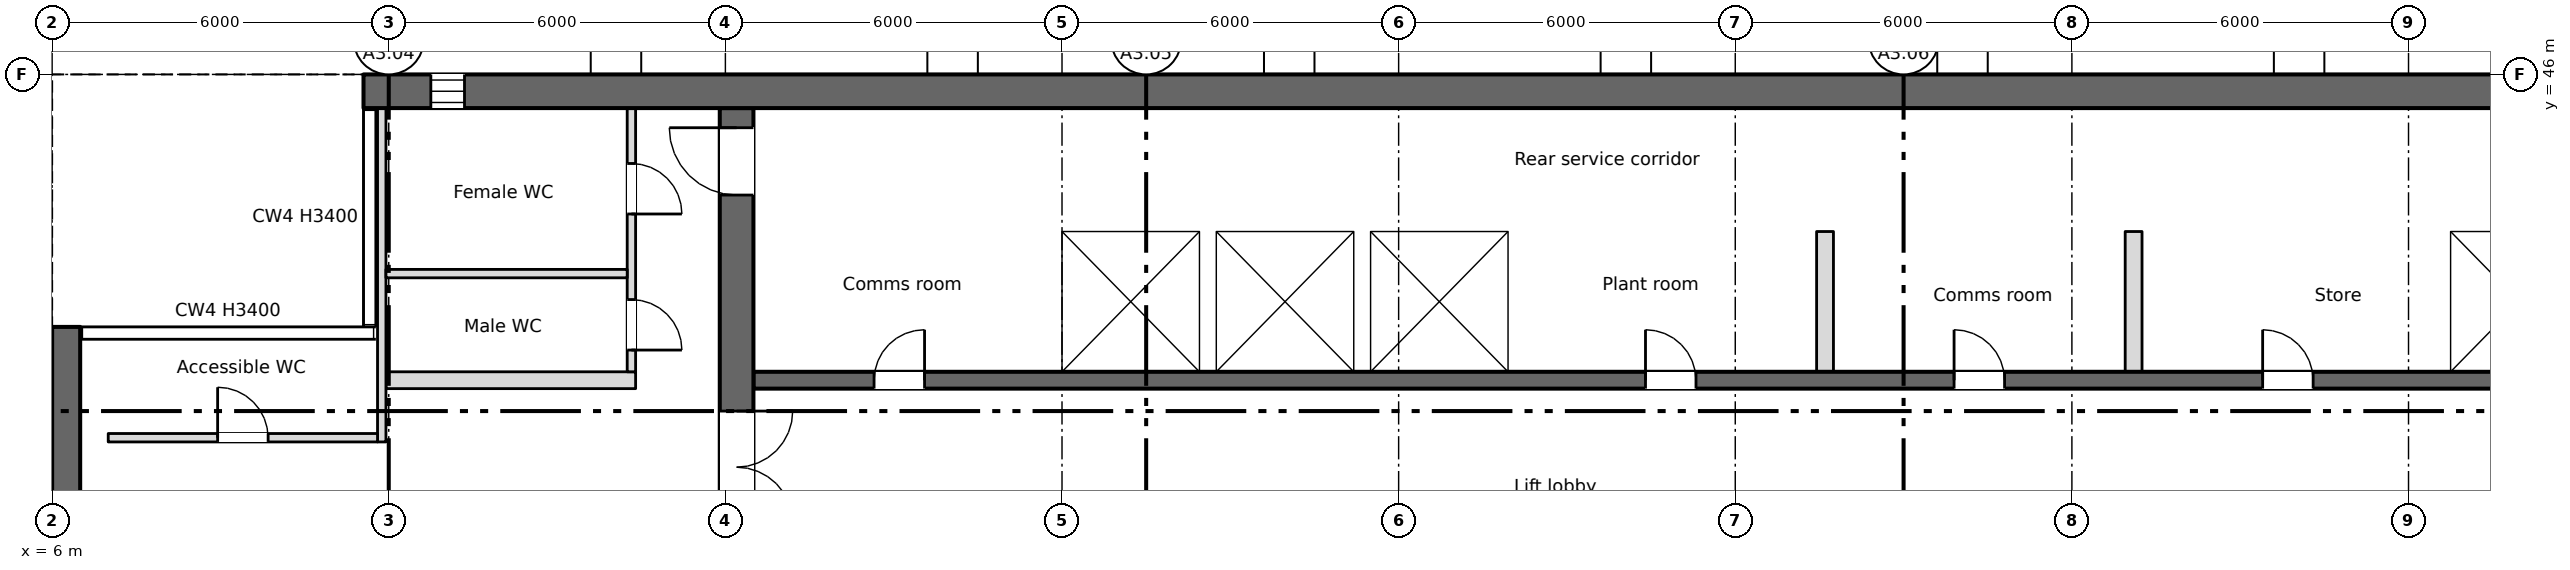
"""IFC4 building model, lengths in metres.
Left out: names, types, materials, properties, quantities, classifications, styles, units other than length and angle.
Written with IfcOpenShell. Run it as: python <this file> out.ifc"""

import sys

from ifc_helpers import new_model, si_unit, direction, frame, frame_2d, origin, place, context, subcontext, project, spatial, rectangle, extrude, element, fill, save


model = new_model("IFC4")
c1 = context("Model", 3, precision=1e-05, world=origin(), true_north=direction((0.0, 1.0)))
c2 = subcontext(c1, "Body", "Model", "MODEL_VIEW")
j1 = project(units=[si_unit("LENGTHUNIT", "METRE"), si_unit("PLANEANGLEUNIT", "RADIAN")], contexts=[c1])
p1 = place(None, origin())
s1 = spatial("IfcSite", under=j1, at=p1, CompositionType="ELEMENT")
p2 = place(p1, origin())
s2 = spatial("IfcBuilding", under=s1, at=p2, CompositionType="ELEMENT")
p3 = place(p2, frame((0.0, 0.0, 231.75)))
s3 = spatial("IfcBuildingStorey", under=s2, at=p3, CompositionType="ELEMENT", Elevation=231.75)
p4 = place(p3, frame((6.25, 8.5, 0.0), z_axis=(0.0, 0.0, 1.0), x_axis=(0.0, 1.0, 0.0)))
e1 = element("IfcWall", 1, at=p4, inside=s3, PredefinedType="SHEAR", context=c2, shape_type="SweptSolid", body=[
    extrude(rectangle(XDim=33.0, YDim=0.5, at=frame_2d((16.5, 0.0))), origin(), (0.0, 0.0, 1.0), 3.4),
])
p5 = place(p4, frame((1.2, 0.0, 0.6)))
e2 = element("IfcOpeningElement", 2, at=p5, cuts=e1, PredefinedType="OPENING", context=c2, shape_type="SweptSolid", body=[
    extrude(rectangle(XDim=0.6, YDim=2.4, at=frame_2d((0.3, 1.2))), frame((0.0, 0.26, 0.0), z_axis=(0.0, -1.0, 0.0), x_axis=(1.0, 0.0, 0.0)), (0.0, 0.0, 1.0), 0.52),
])
p6 = place(p4, frame((7.2, 0.0, 0.6)))
e3 = element("IfcOpeningElement", 3, at=p6, cuts=e1, PredefinedType="OPENING", context=c2, shape_type="SweptSolid", body=[
    extrude(rectangle(XDim=0.6, YDim=2.4, at=frame_2d((0.3, 1.2))), frame((0.0, 0.26, 0.0), z_axis=(0.0, -1.0, 0.0), x_axis=(1.0, 0.0, 0.0)), (0.0, 0.0, 1.0), 0.52),
])
p7 = place(p4, frame((13.2, 0.0, 0.6)))
e4 = element("IfcOpeningElement", 4, at=p7, cuts=e1, PredefinedType="OPENING", context=c2, shape_type="SweptSolid", body=[
    extrude(rectangle(XDim=0.6, YDim=2.4, at=frame_2d((0.3, 1.2))), frame((0.0, 0.26, 0.0), z_axis=(0.0, -1.0, 0.0), x_axis=(1.0, 0.0, 0.0)), (0.0, 0.0, 1.0), 0.52),
])
p8 = place(p3, frame((11.55, 45.7, 0.0), z_axis=(0.0, 0.0, 1.0), x_axis=(1.0, 0.0, 0.0)))
e5 = element("IfcWall", 5, at=p8, inside=s3, PredefinedType="SHEAR", context=c2, shape_type="SweptSolid", body=[
    extrude(rectangle(XDim=48.9, YDim=0.6, at=frame_2d((24.45, 0.0))), origin(), (0.0, 0.0, 1.0), 3.4),
])
p9 = place(p8, frame((1.2, 0.0, 0.6)))
e6 = element("IfcOpeningElement", 6, at=p9, cuts=e5, PredefinedType="OPENING", context=c2, shape_type="SweptSolid", body=[
    extrude(rectangle(XDim=0.6, YDim=2.4, at=frame_2d((0.3, 1.2))), frame((0.0, 0.31, 0.0), z_axis=(0.0, -1.0, 0.0), x_axis=(1.0, 0.0, 0.0)), (0.0, 0.0, 1.0), 0.62),
])
p10 = place(p3, frame((6.75, 28.4, 0.0), z_axis=(0.0, 0.0, 1.0), x_axis=(0.0, 1.0, 0.0)))
e7 = element("IfcWall", 7, at=p10, inside=s3, PredefinedType="SHEAR", context=c2, shape_type="SweptSolid", body=[
    extrude(rectangle(XDim=12.85, YDim=0.5, at=frame_2d((6.425, 0.0))), origin(), (0.0, 0.0, 1.0), 3.4),
])
p11 = place(p3, frame((18.2, 28.4, 0.0), z_axis=(0.0, 0.0, 1.0), x_axis=(0.0, 1.0, 0.0)))
e8 = element("IfcWall", 8, at=p11, inside=s3, PredefinedType="SHEAR", context=c2, shape_type="SweptSolid", body=[
    extrude(rectangle(XDim=17.0, YDim=0.6, at=frame_2d((8.5, 0.0))), origin(), (0.0, 0.0, 1.0), 3.4),
])
p12 = place(p11, frame((9.6, 0.0, 0.0)))
e9 = element("IfcOpeningElement", 9, at=p12, cuts=e8, PredefinedType="OPENING", context=c2, shape_type="SweptSolid", body=[
    extrude(rectangle(XDim=2.0, YDim=2.1, at=frame_2d((1.0, 1.05))), frame((0.0, 0.31, 0.0), z_axis=(0.0, -1.0, 0.0), x_axis=(1.0, 0.0, 0.0)), (0.0, 0.0, 1.0), 0.62),
])
p13 = place(p11, frame((15.45, 0.0, 0.0)))
e10 = element("IfcOpeningElement", 10, at=p13, cuts=e8, PredefinedType="OPENING", context=c2, shape_type="SweptSolid", body=[
    extrude(rectangle(XDim=1.2, YDim=2.1, at=frame_2d((0.6, 1.05))), frame((0.0, 0.31, 0.0), z_axis=(0.0, -1.0, 0.0), x_axis=(1.0, 0.0, 0.0)), (0.0, 0.0, 1.0), 0.62),
])
p14 = place(p3, frame((18.5, 40.55, 0.0), z_axis=(0.0, 0.0, 1.0), x_axis=(1.0, 0.0, 0.0)))
e11 = element("IfcWall", 11, at=p14, inside=s3, PredefinedType="SHEAR", context=c2, shape_type="SweptSolid", body=[
    extrude(rectangle(XDim=41.0, YDim=0.3, at=frame_2d((20.5, 0.0))), origin(), (0.0, 0.0, 1.0), 3.4),
])
p15 = place(p14, frame((2.15, 0.0, 0.0)))
e12 = element("IfcOpeningElement", 12, at=p15, cuts=e11, PredefinedType="OPENING", context=c2, shape_type="SweptSolid", body=[
    extrude(rectangle(XDim=0.9, YDim=2.1, at=frame_2d((0.45, 1.05))), frame((0.0, 0.16, 0.0), z_axis=(0.0, -1.0, 0.0), x_axis=(1.0, 0.0, 0.0)), (0.0, 0.0, 1.0), 0.32),
])
p16 = place(p14, frame((15.9, 0.0, 0.0)))
e13 = element("IfcOpeningElement", 13, at=p16, cuts=e11, PredefinedType="OPENING", context=c2, shape_type="SweptSolid", body=[
    extrude(rectangle(XDim=0.9, YDim=2.1, at=frame_2d((0.45, 1.05))), frame((0.0, 0.16, 0.0), z_axis=(0.0, -1.0, 0.0), x_axis=(1.0, 0.0, 0.0)), (0.0, 0.0, 1.0), 0.32),
])
p17 = place(p14, frame((21.4, 0.0, 0.0)))
e14 = element("IfcOpeningElement", 14, at=p17, cuts=e11, PredefinedType="OPENING", context=c2, shape_type="SweptSolid", body=[
    extrude(rectangle(XDim=0.9, YDim=2.1, at=frame_2d((0.45, 1.05))), frame((0.0, 0.16, 0.0), z_axis=(0.0, -1.0, 0.0), x_axis=(1.0, 0.0, 0.0)), (0.0, 0.0, 1.0), 0.32),
])
p18 = place(p14, frame((26.9, 0.0, 0.0)))
e15 = element("IfcOpeningElement", 15, at=p18, cuts=e11, PredefinedType="OPENING", context=c2, shape_type="SweptSolid", body=[
    extrude(rectangle(XDim=0.9, YDim=2.1, at=frame_2d((0.45, 1.05))), frame((0.0, 0.16, 0.0), z_axis=(0.0, -1.0, 0.0), x_axis=(1.0, 0.0, 0.0)), (0.0, 0.0, 1.0), 0.32),
])
p19 = place(p14, frame((6.175, 0.0, 0.0)))
e16 = element("IfcOpeningElement", 16, at=p19, cuts=e11, PredefinedType="OPENING", context=c2, shape_type="SweptSolid", body=[
    extrude(rectangle(XDim=1.1, YDim=2.1, at=frame_2d((0.55, 1.05))), frame((0.0, 0.16, 0.0), z_axis=(0.0, -1.0, 0.0), x_axis=(1.0, 0.0, 0.0)), (0.0, 0.0, 1.0), 0.32),
])
p20 = place(p14, frame((8.925, 0.0, 0.0)))
e17 = element("IfcOpeningElement", 17, at=p20, cuts=e11, PredefinedType="OPENING", context=c2, shape_type="SweptSolid", body=[
    extrude(rectangle(XDim=1.1, YDim=2.1, at=frame_2d((0.55, 1.05))), frame((0.0, 0.16, 0.0), z_axis=(0.0, -1.0, 0.0), x_axis=(1.0, 0.0, 0.0)), (0.0, 0.0, 1.0), 0.32),
])
p21 = place(p14, frame((11.675, 0.0, 0.0)))
e18 = element("IfcOpeningElement", 18, at=p21, cuts=e11, PredefinedType="OPENING", context=c2, shape_type="SweptSolid", body=[
    extrude(rectangle(XDim=1.1, YDim=2.1, at=frame_2d((0.55, 1.05))), frame((0.0, 0.16, 0.0), z_axis=(0.0, -1.0, 0.0), x_axis=(1.0, 0.0, 0.0)), (0.0, 0.0, 1.0), 0.32),
])
p22 = place(p14, frame((30.925, 0.0, 0.0)))
e19 = element("IfcOpeningElement", 19, at=p22, cuts=e11, PredefinedType="OPENING", context=c2, shape_type="SweptSolid", body=[
    extrude(rectangle(XDim=1.1, YDim=2.1, at=frame_2d((0.55, 1.05))), frame((0.0, 0.16, 0.0), z_axis=(0.0, -1.0, 0.0), x_axis=(1.0, 0.0, 0.0)), (0.0, 0.0, 1.0), 0.32),
])
p23 = place(p14, frame((33.675, 0.0, 0.0)))
e20 = element("IfcOpeningElement", 20, at=p23, cuts=e11, PredefinedType="OPENING", context=c2, shape_type="SweptSolid", body=[
    extrude(rectangle(XDim=1.1, YDim=2.1, at=frame_2d((0.55, 1.05))), frame((0.0, 0.16, 0.0), z_axis=(0.0, -1.0, 0.0), x_axis=(1.0, 0.0, 0.0)), (0.0, 0.0, 1.0), 0.32),
])
p24 = place(p14, frame((36.375, 0.0, 0.0)))
e21 = element("IfcOpeningElement", 21, at=p24, cuts=e11, PredefinedType="OPENING", context=c2, shape_type="SweptSolid", body=[
    extrude(rectangle(XDim=1.2, YDim=2.1, at=frame_2d((0.6, 1.05))), frame((0.0, 0.16, 0.0), z_axis=(0.0, -1.0, 0.0), x_axis=(1.0, 0.0, 0.0)), (0.0, 0.0, 1.0), 0.32),
])
p25 = place(p14, frame((39.15, 0.0, 0.0)))
e22 = element("IfcOpeningElement", 22, at=p25, cuts=e11, PredefinedType="OPENING", context=c2, shape_type="SweptSolid", body=[
    extrude(rectangle(XDim=1.2, YDim=2.1, at=frame_2d((0.6, 1.05))), frame((0.0, 0.16, 0.0), z_axis=(0.0, -1.0, 0.0), x_axis=(1.0, 0.0, 0.0)), (0.0, 0.0, 1.0), 0.32),
])
p26 = place(p3, frame((18.5, 43.35, 0.0), z_axis=(0.0, 0.0, 1.0), x_axis=(1.0, 0.0, 0.0)))
e23 = element("IfcWall", 23, at=p26, inside=s3, PredefinedType="SHEAR", context=c2, shape_type="SweptSolid", body=[
    extrude(rectangle(XDim=41.0, YDim=0.3, at=frame_2d((20.5, 0.0))), origin(), (0.0, 0.0, 1.0), 3.4),
])
p27 = place(p3, frame((11.95, 40.55, 0.0), z_axis=(0.0, 0.0, 1.0), x_axis=(1.0, 0.0, 0.0)))
e24 = element("IfcWall", 24, at=p27, inside=s3, PredefinedType="PARTITIONING", context=c2, shape_type="SweptSolid", body=[
    extrude(rectangle(XDim=4.45, YDim=0.3, at=frame_2d((2.225, 0.0))), origin(), (0.0, 0.0, 1.0), 3.4),
])
for number, where, z_axis, x_axis in (
    (25, (23.85, 40.7, 0.0), (0.0, 0.0, 1.0), (0.0, 1.0, 0.0)),
    (26, (26.6, 40.7, 0.0), (0.0, 0.0, 1.0), (0.0, 1.0, 0.0)),
    (27, (29.35, 40.7, 0.0), (0.0, 0.0, 1.0), (0.0, 1.0, 0.0)),
    (28, (32.1, 40.7, 0.0), (0.0, 0.0, 1.0), (0.0, 1.0, 0.0)),
    (29, (48.6, 40.7, 0.0), (0.0, 0.0, 1.0), (0.0, 1.0, 0.0)),
):
    element("IfcWall", number, at=place(p3, frame(where, z_axis=z_axis, x_axis=x_axis)), inside=s3, PredefinedType="SHEAR", context=c2, shape_type="SweptSolid", body=[
        extrude(rectangle(XDim=2.5, YDim=0.3, at=frame_2d((1.25, 0.0))), origin(), (0.0, 0.0, 1.0), 3.4),
    ])
p28 = place(p3, frame((16.325, 45.4, 0.0), z_axis=(0.0, 0.0, 1.0), x_axis=(0.0, -1.0, 0.0)))
e30 = element("IfcWall", 30, at=p28, inside=s3, PredefinedType="PARTITIONING", context=c2, shape_type="SweptSolid", body=[
    extrude(rectangle(XDim=4.7, YDim=0.15, at=frame_2d((2.35, 0.0))), origin(), (0.0, 0.0, 1.0), 3.4),
])
p29 = place(p28, frame((3.413, 0.0, 0.0)))
e31 = element("IfcOpeningElement", 31, at=p29, cuts=e30, PredefinedType="OPENING", context=c2, shape_type="SweptSolid", body=[
    extrude(rectangle(XDim=0.9, YDim=2.1, at=frame_2d((0.45, 1.05))), frame((0.0, 0.085, 0.0), z_axis=(0.0, -1.0, 0.0), x_axis=(1.0, 0.0, 0.0)), (0.0, 0.0, 1.0), 0.17),
])
p30 = place(p28, frame((0.988, 0.0, 0.0)))
e32 = element("IfcOpeningElement", 32, at=p30, cuts=e30, PredefinedType="OPENING", context=c2, shape_type="SweptSolid", body=[
    extrude(rectangle(XDim=0.9, YDim=2.1, at=frame_2d((0.45, 1.05))), frame((0.0, 0.085, 0.0), z_axis=(0.0, -1.0, 0.0), x_axis=(1.0, 0.0, 0.0)), (0.0, 0.0, 1.0), 0.17),
])
p31 = place(p3, frame((11.875, 39.45, 0.0), z_axis=(0.0, 0.0, 1.0), x_axis=(0.0, 1.0, 0.0)))
e33 = element("IfcWall", 33, at=p31, inside=s3, PredefinedType="PARTITIONING", context=c2, shape_type="SweptSolid", body=[
    extrude(rectangle(XDim=5.95, YDim=0.15, at=frame_2d((2.975, 0.0))), origin(), (0.0, 0.0, 1.0), 3.4),
])
p32 = place(p3, frame((7.0, 39.525, 0.0), z_axis=(0.0, 0.0, 1.0), x_axis=(1.0, 0.0, 0.0)))
e34 = element("IfcWall", 34, at=p32, inside=s3, PredefinedType="PARTITIONING", context=c2, shape_type="SweptSolid", body=[
    extrude(rectangle(XDim=4.8, YDim=0.15, at=frame_2d((2.4, 0.0))), origin(), (0.0, 0.0, 1.0), 3.4),
])
p33 = place(p32, frame((1.95, 0.0, 0.0)))
e35 = element("IfcOpeningElement", 35, at=p33, cuts=e34, PredefinedType="OPENING", context=c2, shape_type="SweptSolid", body=[
    extrude(rectangle(XDim=0.9, YDim=2.1, at=frame_2d((0.45, 1.05))), frame((0.0, 0.085, 0.0), z_axis=(0.0, -1.0, 0.0), x_axis=(1.0, 0.0, 0.0)), (0.0, 0.0, 1.0), 0.17),
])
p34 = place(p3, frame((11.95, 42.45, 0.0), z_axis=(0.0, 0.0, 1.0), x_axis=(1.0, 0.0, 0.0)))
e36 = element("IfcWall", 36, at=p34, inside=s3, PredefinedType="PARTITIONING", context=c2, shape_type="SweptSolid", body=[
    extrude(rectangle(XDim=4.3, YDim=0.15, at=frame_2d((2.15, 0.0))), origin(), (0.0, 0.0, 1.0), 3.4),
])
for number, where, z_axis, x_axis in (
    (37, (37.6, 40.7, 0.0), (0.0, 0.0, 1.0), (0.0, 1.0, 0.0)),
    (38, (43.1, 40.7, 0.0), (0.0, 0.0, 1.0), (0.0, 1.0, 0.0)),
):
    element("IfcWall", number, at=place(p3, frame(where, z_axis=z_axis, x_axis=x_axis)), inside=s3, PredefinedType="PARTITIONING", context=c2, shape_type="SweptSolid", body=[
        extrude(rectangle(XDim=2.5, YDim=0.3, at=frame_2d((1.25, 0.0))), origin(), (0.0, 0.0, 1.0), 3.4),
    ])
p35 = place(p9, origin())
e39 = element("IfcWindow", 39, at=p35, inside=s3, PartitioningType="SINGLE_PANEL", PredefinedType="WINDOW", context=c2, shape_type="SweptSolid", body=[
    extrude(rectangle(XDim=0.6, YDim=2.4, at=frame_2d((0.3, 1.2))), frame((0.0, 0.03, 0.0), z_axis=(0.0, -1.0, 0.0), x_axis=(1.0, 0.0, 0.0)), (0.0, 0.0, 1.0), 0.06),
])
fill(e6, e39)
p36 = place(p33, origin())
e40 = element("IfcDoor", 40, at=p36, inside=s3, OperationType="SINGLE_SWING_LEFT", PredefinedType="DOOR", context=c2, shape_type="SweptSolid", body=[
    extrude(rectangle(XDim=0.9, YDim=2.1, at=frame_2d((0.45, 1.05))), frame((0.0, 0.025, 0.0), z_axis=(0.0, -1.0, 0.0), x_axis=(1.0, 0.0, 0.0)), (0.0, 0.0, 1.0), 0.05),
])
fill(e35, e40)
p37 = place(p29, origin())
e41 = element("IfcDoor", 41, at=p37, inside=s3, OperationType="SINGLE_SWING_RIGHT", PredefinedType="DOOR", context=c2, shape_type="SweptSolid", body=[
    extrude(rectangle(XDim=0.9, YDim=2.1, at=frame_2d((0.45, 1.05))), frame((0.0, 0.025, 0.0), z_axis=(0.0, -1.0, 0.0), x_axis=(1.0, 0.0, 0.0)), (0.0, 0.0, 1.0), 0.05),
])
fill(e31, e41)
p38 = place(p30, origin())
e42 = element("IfcDoor", 42, at=p38, inside=s3, OperationType="SINGLE_SWING_RIGHT", PredefinedType="DOOR", context=c2, shape_type="SweptSolid", body=[
    extrude(rectangle(XDim=0.9, YDim=2.1, at=frame_2d((0.45, 1.05))), frame((0.0, 0.025, 0.0), z_axis=(0.0, -1.0, 0.0), x_axis=(1.0, 0.0, 0.0)), (0.0, 0.0, 1.0), 0.05),
])
fill(e32, e42)
p39 = place(p15, origin())
e43 = element("IfcDoor", 43, at=p39, inside=s3, OperationType="SINGLE_SWING_RIGHT", PredefinedType="DOOR", context=c2, shape_type="SweptSolid", body=[
    extrude(rectangle(XDim=0.9, YDim=2.1, at=frame_2d((0.45, 1.05))), frame((0.0, 0.025, 0.0), z_axis=(0.0, -1.0, 0.0), x_axis=(1.0, 0.0, 0.0)), (0.0, 0.0, 1.0), 0.05),
])
fill(e12, e43)
p40 = place(p16, origin())
e44 = element("IfcDoor", 44, at=p40, inside=s3, OperationType="SINGLE_SWING_LEFT", PredefinedType="DOOR", context=c2, shape_type="SweptSolid", body=[
    extrude(rectangle(XDim=0.9, YDim=2.1, at=frame_2d((0.45, 1.05))), frame((0.0, 0.025, 0.0), z_axis=(0.0, -1.0, 0.0), x_axis=(1.0, 0.0, 0.0)), (0.0, 0.0, 1.0), 0.05),
])
fill(e13, e44)
p41 = place(p17, origin())
e45 = element("IfcDoor", 45, at=p41, inside=s3, OperationType="SINGLE_SWING_LEFT", PredefinedType="DOOR", context=c2, shape_type="SweptSolid", body=[
    extrude(rectangle(XDim=0.9, YDim=2.1, at=frame_2d((0.45, 1.05))), frame((0.0, 0.025, 0.0), z_axis=(0.0, -1.0, 0.0), x_axis=(1.0, 0.0, 0.0)), (0.0, 0.0, 1.0), 0.05),
])
fill(e14, e45)
p42 = place(p18, origin())
e46 = element("IfcDoor", 46, at=p42, inside=s3, OperationType="SINGLE_SWING_LEFT", PredefinedType="DOOR", context=c2, shape_type="SweptSolid", body=[
    extrude(rectangle(XDim=0.9, YDim=2.1, at=frame_2d((0.45, 1.05))), frame((0.0, 0.025, 0.0), z_axis=(0.0, -1.0, 0.0), x_axis=(1.0, 0.0, 0.0)), (0.0, 0.0, 1.0), 0.05),
])
fill(e15, e46)
p43 = place(p19, origin())
e47 = element("IfcDoor", 47, at=p43, inside=s3, OperationType="SLIDING_TO_LEFT", PredefinedType="DOOR", context=c2, shape_type="SweptSolid", body=[
    extrude(rectangle(XDim=1.1, YDim=2.1, at=frame_2d((0.55, 1.05))), frame((0.0, 0.025, 0.0), z_axis=(0.0, -1.0, 0.0), x_axis=(1.0, 0.0, 0.0)), (0.0, 0.0, 1.0), 0.05),
])
fill(e16, e47)
p44 = place(p20, origin())
e48 = element("IfcDoor", 48, at=p44, inside=s3, OperationType="SLIDING_TO_LEFT", PredefinedType="DOOR", context=c2, shape_type="SweptSolid", body=[
    extrude(rectangle(XDim=1.1, YDim=2.1, at=frame_2d((0.55, 1.05))), frame((0.0, 0.025, 0.0), z_axis=(0.0, -1.0, 0.0), x_axis=(1.0, 0.0, 0.0)), (0.0, 0.0, 1.0), 0.05),
])
fill(e17, e48)
p45 = place(p21, origin())
e49 = element("IfcDoor", 49, at=p45, inside=s3, OperationType="SLIDING_TO_LEFT", PredefinedType="DOOR", context=c2, shape_type="SweptSolid", body=[
    extrude(rectangle(XDim=1.1, YDim=2.1, at=frame_2d((0.55, 1.05))), frame((0.0, 0.025, 0.0), z_axis=(0.0, -1.0, 0.0), x_axis=(1.0, 0.0, 0.0)), (0.0, 0.0, 1.0), 0.05),
])
fill(e18, e49)
p46 = place(p22, origin())
e50 = element("IfcDoor", 50, at=p46, inside=s3, OperationType="SLIDING_TO_LEFT", PredefinedType="DOOR", context=c2, shape_type="SweptSolid", body=[
    extrude(rectangle(XDim=1.1, YDim=2.1, at=frame_2d((0.55, 1.05))), frame((0.0, 0.025, 0.0), z_axis=(0.0, -1.0, 0.0), x_axis=(1.0, 0.0, 0.0)), (0.0, 0.0, 1.0), 0.05),
])
fill(e19, e50)
p47 = place(p12, origin())
e51 = element("IfcDoor", 51, at=p47, inside=s3, OperationType="DOUBLE_DOOR_SINGLE_SWING", PredefinedType="DOOR", context=c2, shape_type="SweptSolid", body=[
    extrude(rectangle(XDim=2.0, YDim=2.1, at=frame_2d((1.0, 1.05))), frame((0.0, 0.025, 0.0), z_axis=(0.0, -1.0, 0.0), x_axis=(1.0, 0.0, 0.0)), (0.0, 0.0, 1.0), 0.05),
])
fill(e9, e51)
p48 = place(p13, origin())
e52 = element("IfcDoor", 52, at=p48, inside=s3, OperationType="SINGLE_SWING_RIGHT", PredefinedType="DOOR", context=c2, shape_type="SweptSolid", body=[
    extrude(rectangle(XDim=1.2, YDim=2.1, at=frame_2d((0.6, 1.05))), frame((0.0, 0.025, 0.0), z_axis=(0.0, -1.0, 0.0), x_axis=(1.0, 0.0, 0.0)), (0.0, 0.0, 1.0), 0.05),
])
fill(e10, e52)
save(model, sys.argv[1])
